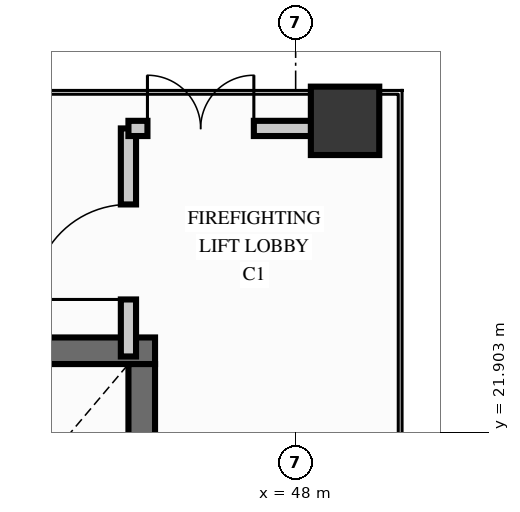
"""IFC4 building model, lengths in metres.
Left out: names, types, materials, properties, quantities, classifications, styles, units other than length and angle.
Written with IfcOpenShell. Run it as: python <this file> out.ifc"""

import sys

from ifc_helpers import new_model, si_unit, direction, frame, frame_2d, origin, origin_2d, place, context, subcontext, project, spatial, rectangle, extrude, element, fill, save


model = new_model("IFC4")
c1 = context("Model", 3, precision=1e-05, world=origin(), true_north=direction((0.0, 1.0)))
c2 = subcontext(c1, "Body", "Model", "MODEL_VIEW")
j1 = project(units=[si_unit("LENGTHUNIT", "METRE"), si_unit("PLANEANGLEUNIT", "RADIAN")], contexts=[c1])
p1 = place(None, origin())
s1 = spatial("IfcSite", under=j1, at=p1, CompositionType="ELEMENT")
p2 = place(p1, origin())
s2 = spatial("IfcBuilding", under=s1, at=p2, CompositionType="ELEMENT")
p3 = place(p2, frame((0.0, 0.0, -4.2)))
s3 = spatial("IfcBuildingStorey", under=s2, at=p3, CompositionType="ELEMENT", Elevation=-4.2)
p4 = place(p3, frame((37.85, 22.975, 0.0), z_axis=(0.0, 0.0, 1.0), x_axis=(1.0, 0.0, 0.0)))
e1 = element("IfcWall", 1, at=p4, inside=s3, PredefinedType="SHEAR", context=c2, shape_type="SweptSolid", body=[
    extrude(rectangle(XDim=8.3, YDim=0.35, at=frame_2d((4.15, 0.0))), origin(), (0.0, 0.0, 1.0), 3.9),
])
p5 = place(p3, frame((45.975, 16.0, 0.0), z_axis=(0.0, 0.0, 1.0), x_axis=(0.0, 1.0, 0.0)))
e2 = element("IfcWall", 2, at=p5, inside=s3, PredefinedType="SHEAR", context=c2, shape_type="SweptSolid", body=[
    extrude(rectangle(XDim=6.8, YDim=0.35, at=frame_2d((3.4, 0.0))), origin(), (0.0, 0.0, 1.0), 3.9),
])
p6 = place(p3, frame((48.65, 26.0, 0.0), z_axis=(0.0, 0.0, 1.0), x_axis=(0.0, 1.0, 0.0)))
e3 = element("IfcColumn", 3, at=p6, inside=s3, PredefinedType="COLUMN", context=c2, shape_type="SweptSolid", body=[
    extrude(rectangle(XDim=0.9, YDim=0.9, at=origin_2d()), origin(), (0.0, 0.0, 1.0), 4.2),
])
p7 = place(p3, frame((45.8, 22.9, 0.0), z_axis=(0.0, 0.0, 1.0), x_axis=(0.0, 1.0, 0.0)))
e4 = element("IfcWall", 4, at=p7, inside=s3, PredefinedType="PARTITIONING", context=c2, shape_type="SweptSolid", body=[
    extrude(rectangle(XDim=3.0, YDim=0.2, at=frame_2d((1.5, 0.0))), origin(), (0.0, 0.0, 1.0), 3.88),
])
p8 = place(p7, frame((0.75, 0.0, 0.0)))
e5 = element("IfcOpeningElement", 5, at=p8, cuts=e4, PredefinedType="OPENING", context=c2, shape_type="SweptSolid", body=[
    extrude(rectangle(XDim=1.25, YDim=2.2, at=frame_2d((0.625, 1.1))), frame((0.0, 0.11, 0.0), z_axis=(0.0, -1.0, 0.0), x_axis=(1.0, 0.0, 0.0)), (0.0, 0.0, 1.0), 0.22),
])
p9 = place(p3, frame((45.8, 25.9, 0.0), z_axis=(0.0, 0.0, 1.0), x_axis=(1.0, 0.0, 0.0)))
e6 = element("IfcWall", 6, at=p9, inside=s3, PredefinedType="PARTITIONING", context=c2, shape_type="SweptSolid", body=[
    extrude(rectangle(XDim=2.85, YDim=0.2, at=frame_2d((1.425, 0.0))), origin(), (0.0, 0.0, 1.0), 3.19),
])
p10 = place(p9, frame((0.25, 0.0, 0.0)))
e7 = element("IfcOpeningElement", 7, at=p10, cuts=e6, PredefinedType="OPENING", context=c2, shape_type="SweptSolid", body=[
    extrude(rectangle(XDim=1.4, YDim=2.25, at=frame_2d((0.7, 1.125))), frame((0.0, 0.11, 0.0), z_axis=(0.0, -1.0, 0.0), x_axis=(1.0, 0.0, 0.0)), (0.0, 0.0, 1.0), 0.22),
])
p11 = place(p10, origin())
e8 = element("IfcDoor", 8, at=p11, inside=s3, OperationType="DOUBLE_DOOR_SINGLE_SWING", PredefinedType="DOOR", context=c2, shape_type="SweptSolid", body=[
    extrude(rectangle(XDim=1.4, YDim=2.25, at=frame_2d((0.7, 1.125))), frame((0.0, 0.025, 0.0), z_axis=(0.0, -1.0, 0.0), x_axis=(1.0, 0.0, 0.0)), (0.0, 0.0, 1.0), 0.05),
])
fill(e7, e8)
p12 = place(p8, origin())
e9 = element("IfcDoor", 9, at=p12, inside=s3, OperationType="SINGLE_SWING_LEFT", PredefinedType="DOOR", context=c2, shape_type="SweptSolid", body=[
    extrude(rectangle(XDim=1.25, YDim=2.2, at=frame_2d((0.625, 1.1))), frame((0.0, 0.025, 0.0), z_axis=(0.0, -1.0, 0.0), x_axis=(1.0, 0.0, 0.0)), (0.0, 0.0, 1.0), 0.05),
])
fill(e5, e9)
save(model, sys.argv[1])
